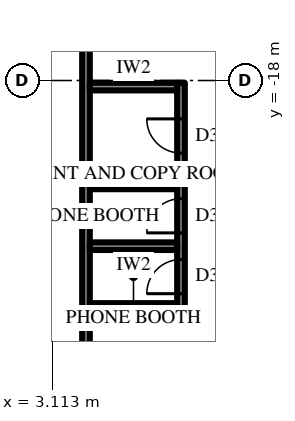
"""IFC4 building model, lengths in metres.
Left out: names, types, materials, properties, quantities, classifications, styles, units other than length and angle.
Written with IfcOpenShell. Run it as: python <this file> out.ifc"""

import sys

from ifc_helpers import new_model, si_unit, direction, frame, frame_2d, origin, place, context, subcontext, project, spatial, rectangle, extrude, element, fill, save


model = new_model("IFC4")
c1 = context("Model", 3, precision=1e-05, world=origin(), true_north=direction((0.0, 1.0)))
c2 = subcontext(c1, "Body", "Model", "MODEL_VIEW")
j1 = project(units=[si_unit("LENGTHUNIT", "METRE"), si_unit("PLANEANGLEUNIT", "RADIAN")], contexts=[c1])
p1 = place(None, origin())
s1 = spatial("IfcSite", under=j1, at=p1, CompositionType="ELEMENT")
p2 = place(p1, origin())
s2 = spatial("IfcBuilding", under=s1, at=p2, CompositionType="ELEMENT")
p3 = place(p2, frame((0.0, 0.0, 94.9)))
s3 = spatial("IfcBuildingStorey", under=s2, at=p3, CompositionType="ELEMENT", Elevation=94.9)
p4 = place(p3, frame((4.0, -14.2, 0.0), z_axis=(0.0, 0.0, 1.0), x_axis=(0.0, -1.0, 0.0)))
e1 = element("IfcWall", 1, at=p4, inside=s3, PredefinedType="PARTITIONING", context=c2, shape_type="SweptSolid", body=[
    extrude(rectangle(XDim=19.6, YDim=0.2, at=frame_2d((9.8, 0.0))), origin(), (0.0, 0.0, 1.0), 4.0),
])
p5 = place(p4, frame((1.46, 0.0, 0.0)))
e2 = element("IfcOpeningElement", 2, at=p5, cuts=e1, PredefinedType="OPENING", context=c2, shape_type="SweptSolid", body=[
    extrude(rectangle(XDim=1.0, YDim=2.2, at=frame_2d((0.5, 1.1))), frame((0.0, 0.11, 0.0), z_axis=(0.0, -1.0, 0.0), x_axis=(1.0, 0.0, 0.0)), (0.0, 0.0, 1.0), 0.22),
])
p6 = place(p3, frame((6.5, -18.06, 0.0), z_axis=(0.0, 0.0, 1.0), x_axis=(0.0, -1.0, 0.0)))
e3 = element("IfcWall", 3, at=p6, inside=s3, PredefinedType="PARTITIONING", context=c2, shape_type="SweptSolid", body=[
    extrude(rectangle(XDim=6.0, YDim=0.2, at=frame_2d((3.0, 0.0))), origin(), (0.0, 0.0, 1.0), 4.0),
])
p7 = place(p6, frame((0.95, 0.0, 0.0)))
e4 = element("IfcOpeningElement", 4, at=p7, cuts=e3, PredefinedType="OPENING", context=c2, shape_type="SweptSolid", body=[
    extrude(rectangle(XDim=0.9, YDim=2.2, at=frame_2d((0.45, 1.1))), frame((0.0, 0.11, 0.0), z_axis=(0.0, -1.0, 0.0), x_axis=(1.0, 0.0, 0.0)), (0.0, 0.0, 1.0), 0.22),
])
p8 = place(p6, frame((3.05, 0.0, 0.0)))
e5 = element("IfcOpeningElement", 5, at=p8, cuts=e3, PredefinedType="OPENING", context=c2, shape_type="SweptSolid", body=[
    extrude(rectangle(XDim=0.9, YDim=2.2, at=frame_2d((0.45, 1.1))), frame((0.0, 0.11, 0.0), z_axis=(0.0, -1.0, 0.0), x_axis=(1.0, 0.0, 0.0)), (0.0, 0.0, 1.0), 0.22),
])
p9 = place(p6, frame((4.65, 0.0, 0.0)))
e6 = element("IfcOpeningElement", 6, at=p9, cuts=e3, PredefinedType="OPENING", context=c2, shape_type="SweptSolid", body=[
    extrude(rectangle(XDim=0.9, YDim=2.2, at=frame_2d((0.45, 1.1))), frame((0.0, 0.11, 0.0), z_axis=(0.0, -1.0, 0.0), x_axis=(1.0, 0.0, 0.0)), (0.0, 0.0, 1.0), 0.22),
])
for number, where, z_axis, x_axis in (
    (7, (4.1, -18.16, 0.0), (0.0, 0.0, 1.0), (1.0, 0.0, 0.0)),
    (8, (4.1, -20.76, 0.0), (0.0, 0.0, 1.0), (1.0, 0.0, 0.0)),
    (9, (4.1, -22.36, 0.0), (0.0, 0.0, 1.0), (1.0, 0.0, 0.0)),
    (10, (4.1, -23.96, 0.0), (0.0, 0.0, 1.0), (1.0, 0.0, 0.0)),
):
    element("IfcWall", number, at=place(p3, frame(where, z_axis=z_axis, x_axis=x_axis)), inside=s3, PredefinedType="PARTITIONING", context=c2, shape_type="SweptSolid", body=[
        extrude(rectangle(XDim=2.3, YDim=0.2, at=frame_2d((1.15, 0.0))), origin(), (0.0, 0.0, 1.0), 4.0),
    ])
p10 = place(p7, frame((0.9, 0.0, 0.0), z_axis=(0.0, 0.0, 1.0), x_axis=(-1.0, 0.0, 0.0)))
e11 = element("IfcDoor", 11, at=p10, inside=s3, OperationType="SINGLE_SWING_LEFT", PredefinedType="DOOR", context=c2, shape_type="SweptSolid", body=[
    extrude(rectangle(XDim=0.9, YDim=2.2, at=frame_2d((0.45, 1.1))), frame((0.0, 0.025, 0.0), z_axis=(0.0, -1.0, 0.0), x_axis=(1.0, 0.0, 0.0)), (0.0, 0.0, 1.0), 0.05),
])
fill(e4, e11)
p11 = place(p8, frame((0.9, 0.0, 0.0), z_axis=(0.0, 0.0, 1.0), x_axis=(-1.0, 0.0, 0.0)))
e12 = element("IfcDoor", 12, at=p11, inside=s3, OperationType="SINGLE_SWING_RIGHT", PredefinedType="DOOR", context=c2, shape_type="SweptSolid", body=[
    extrude(rectangle(XDim=0.9, YDim=2.2, at=frame_2d((0.45, 1.1))), frame((0.0, 0.025, 0.0), z_axis=(0.0, -1.0, 0.0), x_axis=(1.0, 0.0, 0.0)), (0.0, 0.0, 1.0), 0.05),
])
fill(e5, e12)
p12 = place(p9, frame((0.9, 0.0, 0.0), z_axis=(0.0, 0.0, 1.0), x_axis=(-1.0, 0.0, 0.0)))
e13 = element("IfcDoor", 13, at=p12, inside=s3, OperationType="SINGLE_SWING_RIGHT", PredefinedType="DOOR", context=c2, shape_type="SweptSolid", body=[
    extrude(rectangle(XDim=0.9, YDim=2.2, at=frame_2d((0.45, 1.1))), frame((0.0, 0.025, 0.0), z_axis=(0.0, -1.0, 0.0), x_axis=(1.0, 0.0, 0.0)), (0.0, 0.0, 1.0), 0.05),
])
fill(e6, e13)
save(model, sys.argv[1])
